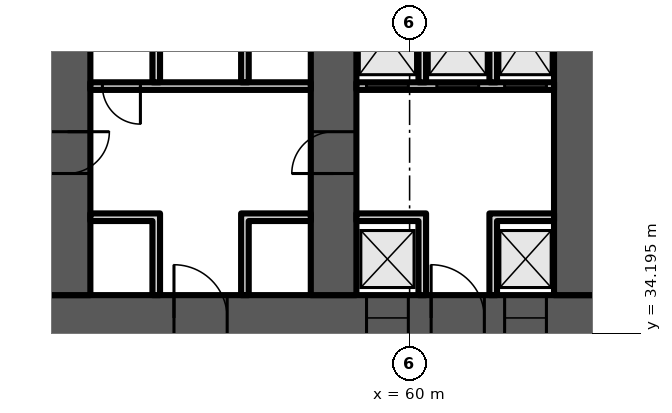
"""IFC4 building model, lengths in metres.
Left out: names, types, materials, properties, quantities, classifications, styles, units other than length and angle.
Written with IfcOpenShell. Run it as: python <this file> out.ifc"""

import sys

from ifc_helpers import new_model, si_unit, direction, frame, frame_2d, origin, place, context, subcontext, project, spatial, polyline, rectangle, outline, extrude, element, fill, save


model = new_model("IFC4")
c1 = context("Model", 3, precision=1e-05, world=origin(), true_north=direction((0.0, 1.0)))
c2 = subcontext(c1, "Body", "Model", "MODEL_VIEW")
j1 = project(units=[si_unit("LENGTHUNIT", "METRE"), si_unit("PLANEANGLEUNIT", "RADIAN")], contexts=[c1])
p1 = place(None, origin())
s1 = spatial("IfcSite", under=j1, at=p1, CompositionType="ELEMENT")
p2 = place(p1, origin())
s2 = spatial("IfcBuilding", under=s1, at=p2, CompositionType="ELEMENT")
p3 = place(p2, frame((0.0, 0.0, 48.7)))
s3 = spatial("IfcBuildingStorey", under=s2, at=p3, CompositionType="ELEMENT", Elevation=48.7)
p4 = place(p3, frame((9.0, 34.6, 0.0), z_axis=(0.0, 0.0, 1.0), x_axis=(1.0, 0.0, 0.0)))
e1 = element("IfcWall", 1, at=p4, inside=s3, PredefinedType="SHEAR", context=c2, shape_type="SweptSolid", body=[
    extrude(rectangle(XDim=56.0, YDim=1.2, at=frame_2d((28.0, 0.0))), origin(), (0.0, 0.0, 1.0), 3.6),
])
p5 = place(p4, frame((3.3, 0.0, 0.0)))
e2 = element("IfcOpeningElement", 2, at=p5, cuts=e1, PredefinedType="OPENING", context=c2, shape_type="SweptSolid", body=[
    extrude(rectangle(XDim=1.0, YDim=2.1, at=frame_2d((0.5, 1.05))), frame((0.0, 0.61, 0.0), z_axis=(0.0, -1.0, 0.0), x_axis=(1.0, 0.0, 0.0)), (0.0, 0.0, 1.0), 1.22),
])
p6 = place(p4, frame((7.867, 0.0, 0.0)))
e3 = element("IfcOpeningElement", 3, at=p6, cuts=e1, PredefinedType="OPENING", context=c2, shape_type="SweptSolid", body=[
    extrude(rectangle(XDim=1.1, YDim=2.1, at=frame_2d((0.55, 1.05))), frame((0.0, 0.61, 0.0), z_axis=(0.0, -1.0, 0.0), x_axis=(1.0, 0.0, 0.0)), (0.0, 0.0, 1.0), 1.22),
])
p7 = place(p4, frame((12.033, 0.0, 0.0)))
e4 = element("IfcOpeningElement", 4, at=p7, cuts=e1, PredefinedType="OPENING", context=c2, shape_type="SweptSolid", body=[
    extrude(rectangle(XDim=1.1, YDim=2.1, at=frame_2d((0.55, 1.05))), frame((0.0, 0.61, 0.0), z_axis=(0.0, -1.0, 0.0), x_axis=(1.0, 0.0, 0.0)), (0.0, 0.0, 1.0), 1.22),
])
p8 = place(p4, frame((9.8, 0.0, 0.0)))
e5 = element("IfcOpeningElement", 5, at=p8, cuts=e1, PredefinedType="OPENING", context=c2, shape_type="SweptSolid", body=[
    extrude(rectangle(XDim=1.4, YDim=2.1, at=frame_2d((0.7, 1.05))), frame((0.0, 0.61, 0.0), z_axis=(0.0, -1.0, 0.0), x_axis=(1.0, 0.0, 0.0)), (0.0, 0.0, 1.0), 1.22),
])
p9 = place(p4, frame((14.65, 0.0, 0.0)))
e6 = element("IfcOpeningElement", 6, at=p9, cuts=e1, PredefinedType="OPENING", context=c2, shape_type="SweptSolid", body=[
    extrude(rectangle(XDim=1.2, YDim=2.1, at=frame_2d((0.6, 1.05))), frame((0.0, 0.61, 0.0), z_axis=(0.0, -1.0, 0.0), x_axis=(1.0, 0.0, 0.0)), (0.0, 0.0, 1.0), 1.22),
])
p10 = place(p4, frame((21.867, 0.0, 0.0)))
e7 = element("IfcOpeningElement", 7, at=p10, cuts=e1, PredefinedType="OPENING", context=c2, shape_type="SweptSolid", body=[
    extrude(rectangle(XDim=1.1, YDim=2.1, at=frame_2d((0.55, 1.05))), frame((0.0, 0.61, 0.0), z_axis=(0.0, -1.0, 0.0), x_axis=(1.0, 0.0, 0.0)), (0.0, 0.0, 1.0), 1.22),
])
p11 = place(p4, frame((26.033, 0.0, 0.0)))
e8 = element("IfcOpeningElement", 8, at=p11, cuts=e1, PredefinedType="OPENING", context=c2, shape_type="SweptSolid", body=[
    extrude(rectangle(XDim=1.1, YDim=2.1, at=frame_2d((0.55, 1.05))), frame((0.0, 0.61, 0.0), z_axis=(0.0, -1.0, 0.0), x_axis=(1.0, 0.0, 0.0)), (0.0, 0.0, 1.0), 1.22),
])
p12 = place(p4, frame((23.8, 0.0, 0.0)))
e9 = element("IfcOpeningElement", 9, at=p12, cuts=e1, PredefinedType="OPENING", context=c2, shape_type="SweptSolid", body=[
    extrude(rectangle(XDim=1.4, YDim=2.1, at=frame_2d((0.7, 1.05))), frame((0.0, 0.61, 0.0), z_axis=(0.0, -1.0, 0.0), x_axis=(1.0, 0.0, 0.0)), (0.0, 0.0, 1.0), 1.22),
])
p13 = place(p4, frame((28.867, 0.0, 0.0)))
e10 = element("IfcOpeningElement", 10, at=p13, cuts=e1, PredefinedType="OPENING", context=c2, shape_type="SweptSolid", body=[
    extrude(rectangle(XDim=1.1, YDim=2.1, at=frame_2d((0.55, 1.05))), frame((0.0, 0.61, 0.0), z_axis=(0.0, -1.0, 0.0), x_axis=(1.0, 0.0, 0.0)), (0.0, 0.0, 1.0), 1.22),
])
p14 = place(p4, frame((33.033, 0.0, 0.0)))
e11 = element("IfcOpeningElement", 11, at=p14, cuts=e1, PredefinedType="OPENING", context=c2, shape_type="SweptSolid", body=[
    extrude(rectangle(XDim=1.1, YDim=2.1, at=frame_2d((0.55, 1.05))), frame((0.0, 0.61, 0.0), z_axis=(0.0, -1.0, 0.0), x_axis=(1.0, 0.0, 0.0)), (0.0, 0.0, 1.0), 1.22),
])
p15 = place(p4, frame((40.15, 0.0, 0.0)))
e12 = element("IfcOpeningElement", 12, at=p15, cuts=e1, PredefinedType="OPENING", context=c2, shape_type="SweptSolid", body=[
    extrude(rectangle(XDim=1.2, YDim=2.1, at=frame_2d((0.6, 1.05))), frame((0.0, 0.61, 0.0), z_axis=(0.0, -1.0, 0.0), x_axis=(1.0, 0.0, 0.0)), (0.0, 0.0, 1.0), 1.22),
])
p16 = place(p4, frame((44.8, 0.0, 0.0)))
e13 = element("IfcOpeningElement", 13, at=p16, cuts=e1, PredefinedType="OPENING", context=c2, shape_type="SweptSolid", body=[
    extrude(rectangle(XDim=1.4, YDim=2.1, at=frame_2d((0.7, 1.05))), frame((0.0, 0.61, 0.0), z_axis=(0.0, -1.0, 0.0), x_axis=(1.0, 0.0, 0.0)), (0.0, 0.0, 1.0), 1.22),
])
p17 = place(p4, frame((49.867, 0.0, 0.0)))
e14 = element("IfcOpeningElement", 14, at=p17, cuts=e1, PredefinedType="OPENING", context=c2, shape_type="SweptSolid", body=[
    extrude(rectangle(XDim=1.1, YDim=2.1, at=frame_2d((0.55, 1.05))), frame((0.0, 0.61, 0.0), z_axis=(0.0, -1.0, 0.0), x_axis=(1.0, 0.0, 0.0)), (0.0, 0.0, 1.0), 1.22),
])
p18 = place(p4, frame((53.5, 0.0, 0.0)))
e15 = element("IfcOpeningElement", 15, at=p18, cuts=e1, PredefinedType="OPENING", context=c2, shape_type="SweptSolid", body=[
    extrude(rectangle(XDim=1.1, YDim=2.1, at=frame_2d((0.55, 1.05))), frame((0.0, 0.61, 0.0), z_axis=(0.0, -1.0, 0.0), x_axis=(1.0, 0.0, 0.0)), (0.0, 0.0, 1.0), 1.22),
])
p19 = place(p4, frame((51.567, 0.0, 0.0)))
e16 = element("IfcOpeningElement", 16, at=p19, cuts=e1, PredefinedType="OPENING", context=c2, shape_type="SweptSolid", body=[
    extrude(rectangle(XDim=1.4, YDim=2.1, at=frame_2d((0.7, 1.05))), frame((0.0, 0.61, 0.0), z_axis=(0.0, -1.0, 0.0), x_axis=(1.0, 0.0, 0.0)), (0.0, 0.0, 1.0), 1.22),
])
p20 = place(p3, frame((51.0, 35.2, 0.0), z_axis=(0.0, 0.0, 1.0), x_axis=(0.0, 1.0, 0.0)))
e17 = element("IfcWall", 17, at=p20, inside=s3, PredefinedType="SHEAR", context=c2, shape_type="SweptSolid", body=[
    extrude(rectangle(XDim=13.555, YDim=1.2, at=frame_2d((6.778, 0.0))), origin(), (0.0, 0.0, 1.0), 3.6),
])
p21 = place(p20, frame((3.2, 0.0, 0.0)))
e18 = element("IfcOpeningElement", 18, at=p21, cuts=e17, PredefinedType="OPENING", context=c2, shape_type="SweptSolid", body=[
    extrude(rectangle(XDim=1.1, YDim=2.1, at=frame_2d((0.55, 1.05))), frame((0.0, 0.61, 0.0), z_axis=(0.0, -1.0, 0.0), x_axis=(1.0, 0.0, 0.0)), (0.0, 0.0, 1.0), 1.22),
])
p22 = place(p3, frame((58.0, 35.2, 0.0), z_axis=(0.0, 0.0, 1.0), x_axis=(0.0, 1.0, 0.0)))
e19 = element("IfcWall", 19, at=p22, inside=s3, PredefinedType="SHEAR", context=c2, shape_type="SweptSolid", body=[
    extrude(rectangle(XDim=12.943, YDim=1.2, at=frame_2d((6.471, 0.0))), origin(), (0.0, 0.0, 1.0), 3.6),
])
p23 = place(p22, frame((10.134, 0.0, 0.0)))
e20 = element("IfcOpeningElement", 20, at=p23, cuts=e19, PredefinedType="OPENING", context=c2, shape_type="SweptSolid", body=[
    extrude(rectangle(XDim=1.0, YDim=2.1, at=frame_2d((0.5, 1.05))), frame((0.0, 0.61, 0.0), z_axis=(0.0, -1.0, 0.0), x_axis=(1.0, 0.0, 0.0)), (0.0, 0.0, 1.0), 1.22),
])
p24 = place(p22, frame((3.2, 0.0, 0.0)))
e21 = element("IfcOpeningElement", 21, at=p24, cuts=e19, PredefinedType="OPENING", context=c2, shape_type="SweptSolid", body=[
    extrude(rectangle(XDim=1.1, YDim=2.1, at=frame_2d((0.55, 1.05))), frame((0.0, 0.61, 0.0), z_axis=(0.0, -1.0, 0.0), x_axis=(1.0, 0.0, 0.0)), (0.0, 0.0, 1.0), 1.22),
])
p25 = place(p3, frame((64.4, 35.2, 0.0), z_axis=(0.0, 0.0, 1.0), x_axis=(0.0, 1.0, 0.0)))
e22 = element("IfcWall", 22, at=p25, inside=s3, PredefinedType="SHEAR", context=c2, shape_type="SweptSolid", body=[
    extrude(rectangle(XDim=12.383, YDim=1.2, at=frame_2d((6.191, 0.0))), origin(), (0.0, 0.0, 1.0), 3.6),
])
p26 = place(p3, frame((51.6, 40.7, 0.0), z_axis=(0.0, 0.0, 1.0), x_axis=(1.0, 0.0, 0.0)))
e23 = element("IfcWall", 23, at=p26, inside=s3, PredefinedType="PARTITIONING", context=c2, shape_type="SweptSolid", body=[
    extrude(rectangle(XDim=5.8, YDim=0.2, at=frame_2d((2.9, 0.0))), origin(), (0.0, 0.0, 1.0), 3.2),
])
p27 = place(p26, frame((0.317, 0.0, 0.0)))
e24 = element("IfcOpeningElement", 24, at=p27, cuts=e23, PredefinedType="OPENING", context=c2, shape_type="SweptSolid", body=[
    extrude(rectangle(XDim=1.0, YDim=2.1, at=frame_2d((0.5, 1.05))), frame((0.0, 0.11, 0.0), z_axis=(0.0, -1.0, 0.0), x_axis=(1.0, 0.0, 0.0)), (0.0, 0.0, 1.0), 0.22),
])
p28 = place(p3, frame((0.0, 0.0, -0.0)))
e25 = element("IfcWall", 25, at=p28, inside=s3, PredefinedType="PARTITIONING", context=c2, shape_type="SweptSolid", body=[
    extrude(outline(polyline([(53.233, 37.15), (51.6, 37.15), (51.6, 37.35), (53.233, 37.35), (53.433, 37.35), (53.433, 35.2), (53.233, 35.2), (53.233, 37.15)])), origin(), (0.0, 0.0, 1.0), 3.2),
])
p29 = place(p3, frame((0.0, 0.0, -0.0)))
e26 = element("IfcWall", 26, at=p29, inside=s3, PredefinedType="PARTITIONING", context=c2, shape_type="SweptSolid", body=[
    extrude(outline(polyline([(55.567, 37.35), (55.767, 37.35), (57.4, 37.35), (57.4, 37.15), (55.767, 37.15), (55.767, 35.2), (55.567, 35.2), (55.567, 37.35)])), origin(), (0.0, 0.0, 1.0), 3.2),
])
p30 = place(p3, frame((0.0, 0.0, -0.0)))
e27 = element("IfcWall", 27, at=p30, inside=s3, PredefinedType="PARTITIONING", context=c2, shape_type="SweptSolid", body=[
    extrude(outline(polyline([(53.233, 40.8), (53.233, 43.8), (53.433, 43.8), (53.433, 40.8), (53.233, 40.8)])), origin(), (0.0, 0.0, 1.0), 3.2),
])
p31 = place(p3, frame((0.0, 0.0, -0.0)))
e28 = element("IfcWall", 28, at=p31, inside=s3, PredefinedType="PARTITIONING", context=c2, shape_type="SweptSolid", body=[
    extrude(outline(polyline([(55.567, 40.8), (55.567, 43.8), (55.767, 43.8), (55.767, 40.8), (55.567, 40.8)])), origin(), (0.0, 0.0, 1.0), 3.2),
])
p32 = place(p3, frame((58.6, 40.7, 0.0), z_axis=(0.0, 0.0, 1.0), x_axis=(1.0, 0.0, 0.0)))
e29 = element("IfcWall", 29, at=p32, inside=s3, PredefinedType="PARTITIONING", context=c2, shape_type="SweptSolid", body=[
    extrude(rectangle(XDim=5.2, YDim=0.2, at=frame_2d((2.6, 0.0))), origin(), (0.0, 0.0, 1.0), 3.2),
])
p33 = place(p32, frame((0.267, 0.0, 0.0)))
e30 = element("IfcOpeningElement", 30, at=p33, cuts=e29, PredefinedType="OPENING", context=c2, shape_type="SweptSolid", body=[
    extrude(rectangle(XDim=1.1, YDim=2.1, at=frame_2d((0.55, 1.05))), frame((0.0, 0.11, 0.0), z_axis=(0.0, -1.0, 0.0), x_axis=(1.0, 0.0, 0.0)), (0.0, 0.0, 1.0), 0.22),
])
p34 = place(p32, frame((2.117, 0.0, 0.0)))
e31 = element("IfcOpeningElement", 31, at=p34, cuts=e29, PredefinedType="OPENING", context=c2, shape_type="SweptSolid", body=[
    extrude(rectangle(XDim=1.1, YDim=2.1, at=frame_2d((0.55, 1.05))), frame((0.0, 0.11, 0.0), z_axis=(0.0, -1.0, 0.0), x_axis=(1.0, 0.0, 0.0)), (0.0, 0.0, 1.0), 0.22),
])
p35 = place(p32, frame((3.9, 0.0, 0.0)))
e32 = element("IfcOpeningElement", 32, at=p35, cuts=e29, PredefinedType="OPENING", context=c2, shape_type="SweptSolid", body=[
    extrude(rectangle(XDim=1.1, YDim=2.1, at=frame_2d((0.55, 1.05))), frame((0.0, 0.11, 0.0), z_axis=(0.0, -1.0, 0.0), x_axis=(1.0, 0.0, 0.0)), (0.0, 0.0, 1.0), 0.22),
])
p36 = place(p3, frame((0.0, 0.0, -0.0)))
e33 = element("IfcWall", 33, at=p36, inside=s3, PredefinedType="PARTITIONING", context=c2, shape_type="SweptSolid", body=[
    extrude(outline(polyline([(60.233, 37.15), (58.6, 37.15), (58.6, 37.35), (60.233, 37.35), (60.433, 37.35), (60.433, 35.2), (60.233, 35.2), (60.233, 37.15)])), origin(), (0.0, 0.0, 1.0), 3.2),
])
p37 = place(p3, frame((0.0, 0.0, -0.0)))
e34 = element("IfcWall", 34, at=p37, inside=s3, PredefinedType="PARTITIONING", context=c2, shape_type="SweptSolid", body=[
    extrude(outline(polyline([(62.1, 37.35), (62.3, 37.35), (63.8, 37.35), (63.8, 37.15), (62.3, 37.15), (62.3, 35.2), (62.1, 35.2), (62.1, 37.35)])), origin(), (0.0, 0.0, 1.0), 3.2),
])
p38 = place(p3, frame((0.0, 0.0, -0.0)))
e35 = element("IfcWall", 35, at=p38, inside=s3, PredefinedType="PARTITIONING", context=c2, shape_type="SweptSolid", body=[
    extrude(outline(polyline([(60.433, 40.8), (60.233, 40.8), (60.233, 43.8), (58.6, 43.8), (58.6, 44.0), (63.8, 44.0), (63.8, 43.8), (62.3, 43.8), (62.3, 40.8), (62.1, 40.8), (62.1, 43.8), (60.433, 43.8), (60.433, 40.8)])), origin(), (0.0, 0.0, 1.0), 3.2),
])
p39 = place(p16, origin())
e36 = element("IfcDoor", 36, at=p39, inside=s3, OperationType="DOUBLE_DOOR_SINGLE_SWING", PredefinedType="DOOR", context=c2, shape_type="SweptSolid", body=[
    extrude(rectangle(XDim=1.4, YDim=2.1, at=frame_2d((0.7, 1.05))), frame((0.0, 0.025, 0.0), z_axis=(0.0, -1.0, 0.0), x_axis=(1.0, 0.0, 0.0)), (0.0, 0.0, 1.0), 0.05),
])
fill(e13, e36)
p40 = place(p27, origin())
e37 = element("IfcDoor", 37, at=p40, inside=s3, OperationType="SINGLE_SWING_RIGHT", PredefinedType="DOOR", context=c2, shape_type="SweptSolid", body=[
    extrude(rectangle(XDim=1.0, YDim=2.1, at=frame_2d((0.5, 1.05))), frame((0.0, 0.025, 0.0), z_axis=(0.0, -1.0, 0.0), x_axis=(1.0, 0.0, 0.0)), (0.0, 0.0, 1.0), 0.05),
])
fill(e24, e37)
p41 = place(p17, origin())
e38 = element("IfcDoor", 38, at=p41, inside=s3, OperationType="DOUBLE_DOOR_SLIDING", PredefinedType="DOOR", context=c2, shape_type="SweptSolid", body=[
    extrude(rectangle(XDim=1.1, YDim=2.1, at=frame_2d((0.55, 1.05))), frame((0.0, 0.025, 0.0), z_axis=(0.0, -1.0, 0.0), x_axis=(1.0, 0.0, 0.0)), (0.0, 0.0, 1.0), 0.05),
])
fill(e14, e38)
p42 = place(p18, origin())
e39 = element("IfcDoor", 39, at=p42, inside=s3, OperationType="DOUBLE_DOOR_SLIDING", PredefinedType="DOOR", context=c2, shape_type="SweptSolid", body=[
    extrude(rectangle(XDim=1.1, YDim=2.1, at=frame_2d((0.55, 1.05))), frame((0.0, 0.025, 0.0), z_axis=(0.0, -1.0, 0.0), x_axis=(1.0, 0.0, 0.0)), (0.0, 0.0, 1.0), 0.05),
])
fill(e15, e39)
p43 = place(p19, origin())
e40 = element("IfcDoor", 40, at=p43, inside=s3, OperationType="DOUBLE_DOOR_SINGLE_SWING", PredefinedType="DOOR", context=c2, shape_type="SweptSolid", body=[
    extrude(rectangle(XDim=1.4, YDim=2.1, at=frame_2d((0.7, 1.05))), frame((0.0, 0.025, 0.0), z_axis=(0.0, -1.0, 0.0), x_axis=(1.0, 0.0, 0.0)), (0.0, 0.0, 1.0), 0.05),
])
fill(e16, e40)
p44 = place(p33, origin())
e41 = element("IfcDoor", 41, at=p44, inside=s3, OperationType="DOUBLE_DOOR_SLIDING", PredefinedType="DOOR", context=c2, shape_type="SweptSolid", body=[
    extrude(rectangle(XDim=1.1, YDim=2.1, at=frame_2d((0.55, 1.05))), frame((0.0, 0.025, 0.0), z_axis=(0.0, -1.0, 0.0), x_axis=(1.0, 0.0, 0.0)), (0.0, 0.0, 1.0), 0.05),
])
fill(e30, e41)
p45 = place(p34, origin())
e42 = element("IfcDoor", 42, at=p45, inside=s3, OperationType="DOUBLE_DOOR_SLIDING", PredefinedType="DOOR", context=c2, shape_type="SweptSolid", body=[
    extrude(rectangle(XDim=1.1, YDim=2.1, at=frame_2d((0.55, 1.05))), frame((0.0, 0.025, 0.0), z_axis=(0.0, -1.0, 0.0), x_axis=(1.0, 0.0, 0.0)), (0.0, 0.0, 1.0), 0.05),
])
fill(e31, e42)
p46 = place(p35, origin())
e43 = element("IfcDoor", 43, at=p46, inside=s3, OperationType="DOUBLE_DOOR_SLIDING", PredefinedType="DOOR", context=c2, shape_type="SweptSolid", body=[
    extrude(rectangle(XDim=1.1, YDim=2.1, at=frame_2d((0.55, 1.05))), frame((0.0, 0.025, 0.0), z_axis=(0.0, -1.0, 0.0), x_axis=(1.0, 0.0, 0.0)), (0.0, 0.0, 1.0), 0.05),
])
fill(e32, e43)
p47 = place(p21, origin())
e44 = element("IfcDoor", 44, at=p47, inside=s3, OperationType="SINGLE_SWING_RIGHT", PredefinedType="DOOR", context=c2, shape_type="SweptSolid", body=[
    extrude(rectangle(XDim=1.1, YDim=2.1, at=frame_2d((0.55, 1.05))), frame((0.0, 0.025, 0.0), z_axis=(0.0, -1.0, 0.0), x_axis=(1.0, 0.0, 0.0)), (0.0, 0.0, 1.0), 0.05),
])
fill(e18, e44)
p48 = place(p24, origin())
e45 = element("IfcDoor", 45, at=p48, inside=s3, OperationType="SINGLE_SWING_LEFT", PredefinedType="DOOR", context=c2, shape_type="SweptSolid", body=[
    extrude(rectangle(XDim=1.1, YDim=2.1, at=frame_2d((0.55, 1.05))), frame((0.0, 0.025, 0.0), z_axis=(0.0, -1.0, 0.0), x_axis=(1.0, 0.0, 0.0)), (0.0, 0.0, 1.0), 0.05),
])
fill(e21, e45)
save(model, sys.argv[1])
